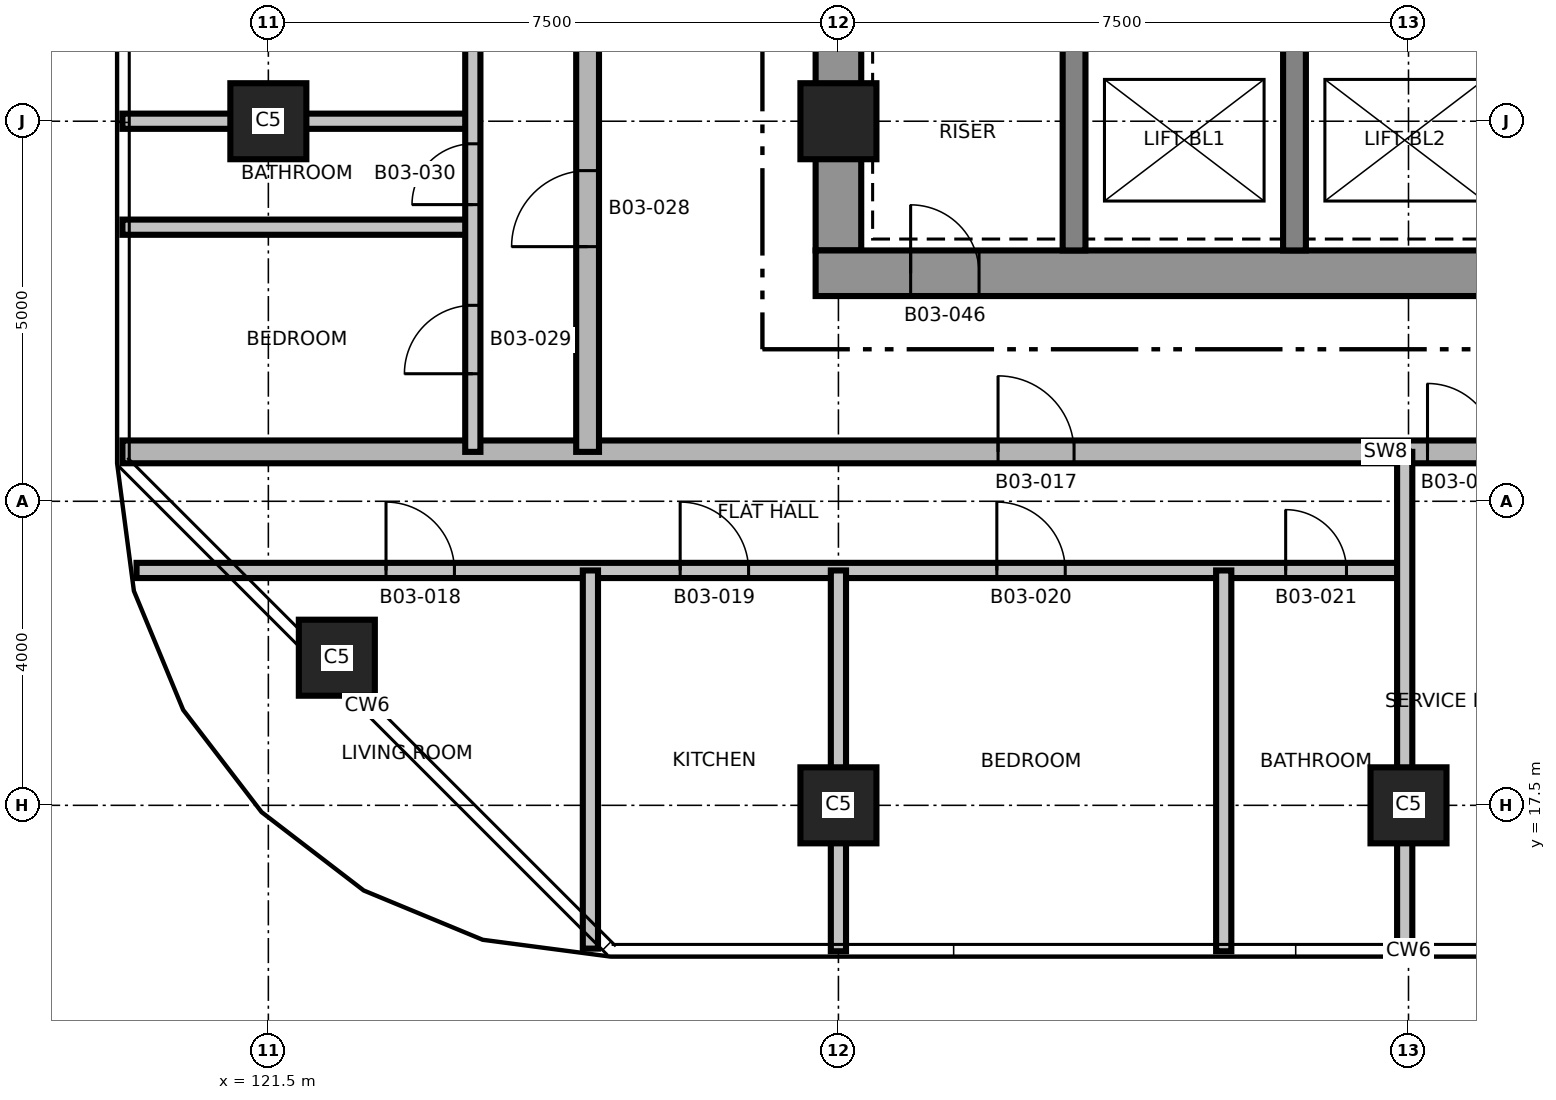
"""IFC4 building model, lengths in metres.
Left out: names, types, materials, properties, quantities, classifications, styles, units other than length and angle.
Written with IfcOpenShell. Run it as: python <this file> out.ifc"""

import sys

from ifc_helpers import new_model, si_unit, direction, frame, frame_2d, origin, origin_2d, place, context, subcontext, project, spatial, rectangle, extrude, element, fill, save


model = new_model("IFC4")
c1 = context("Model", 3, precision=1e-05, world=origin(), true_north=direction((0.0, 1.0)))
c2 = subcontext(c1, "Body", "Model", "MODEL_VIEW")
j1 = project(units=[si_unit("LENGTHUNIT", "METRE"), si_unit("PLANEANGLEUNIT", "RADIAN")], contexts=[c1])
p1 = place(None, origin())
s1 = spatial("IfcSite", under=j1, at=p1, CompositionType="ELEMENT")
p2 = place(p1, origin())
s2 = spatial("IfcBuilding", under=s1, at=p2, CompositionType="ELEMENT")
p3 = place(p2, frame((0.0, 0.0, 52.0)))
s3 = spatial("IfcBuildingStorey", under=s2, at=p3, CompositionType="ELEMENT", Elevation=52.0)
p4 = place(p3, frame((129.0, 24.8, 0.0), z_axis=(0.0, 0.0, 1.0), x_axis=(0.0, 1.0, 0.0)))
e1 = element("IfcWall", 1, at=p4, inside=s3, PredefinedType="SHEAR", context=c2, shape_type="SweptSolid", body=[
    extrude(rectangle(XDim=12.4, YDim=0.6, at=frame_2d((6.2, 0.0))), origin(), (0.0, 0.0, 1.0), 3.7),
])
p5 = place(p4, frame((5.15, 0.0, 0.0)))
e2 = element("IfcOpeningElement", 2, at=p5, cuts=e1, PredefinedType="OPENING", context=c2, shape_type="SweptSolid", body=[
    extrude(rectangle(XDim=1.0, YDim=2.1, at=frame_2d((0.5, 1.05))), frame((0.0, 0.31, 0.0), z_axis=(0.0, -1.0, 0.0), x_axis=(1.0, 0.0, 0.0)), (0.0, 0.0, 1.0), 0.62),
])
p6 = place(p3, frame((128.7, 24.5, 0.0), z_axis=(0.0, 0.0, 1.0), x_axis=(1.0, 0.0, 0.0)))
e3 = element("IfcWall", 3, at=p6, inside=s3, PredefinedType="SHEAR", context=c2, shape_type="SweptSolid", body=[
    extrude(rectangle(XDim=15.0, YDim=0.6, at=frame_2d((7.5, 0.0))), origin(), (0.0, 0.0, 1.0), 3.7),
])
p7 = place(p6, frame((9.65, 0.0, 0.0)))
e4 = element("IfcOpeningElement", 4, at=p7, cuts=e3, PredefinedType="OPENING", context=c2, shape_type="SweptSolid", body=[
    extrude(rectangle(XDim=1.5, YDim=2.1, at=frame_2d((0.75, 1.05))), frame((0.0, 0.31, 0.0), z_axis=(0.0, -1.0, 0.0), x_axis=(1.0, 0.0, 0.0)), (0.0, 0.0, 1.0), 0.62),
])
p8 = place(p6, frame((1.25, 0.0, 0.0)))
e5 = element("IfcOpeningElement", 5, at=p8, cuts=e3, PredefinedType="OPENING", context=c2, shape_type="SweptSolid", body=[
    extrude(rectangle(XDim=0.9, YDim=2.1, at=frame_2d((0.45, 1.05))), frame((0.0, 0.31, 0.0), z_axis=(0.0, -1.0, 0.0), x_axis=(1.0, 0.0, 0.0)), (0.0, 0.0, 1.0), 0.62),
])
p9 = place(p3, frame((132.1, 24.8, 0.0), z_axis=(0.0, 0.0, 1.0), x_axis=(0.0, 1.0, 0.0)))
e6 = element("IfcWall", 6, at=p9, inside=s3, PredefinedType="SHEAR", context=c2, shape_type="SweptSolid", body=[
    extrude(rectangle(XDim=12.4, YDim=0.3, at=frame_2d((6.2, 0.0))), origin(), (0.0, 0.0, 1.0), 3.7),
])
p10 = place(p9, frame((3.9, 0.0, 0.0)))
e7 = element("IfcOpeningElement", 7, at=p10, cuts=e6, PredefinedType="OPENING", context=c2, shape_type="SweptSolid", body=[
    extrude(rectangle(XDim=1.2, YDim=2.1, at=frame_2d((0.6, 1.05))), frame((0.0, 0.16, 0.0), z_axis=(0.0, -1.0, 0.0), x_axis=(1.0, 0.0, 0.0)), (0.0, 0.0, 1.0), 0.32),
])
p11 = place(p3, frame((135.0, 24.8, 0.0), z_axis=(0.0, 0.0, 1.0), x_axis=(0.0, 1.0, 0.0)))
e8 = element("IfcWall", 8, at=p11, inside=s3, PredefinedType="SHEAR", context=c2, shape_type="SweptSolid", body=[
    extrude(rectangle(XDim=2.75, YDim=0.3, at=frame_2d((1.375, 0.0))), origin(), (0.0, 0.0, 1.0), 3.7),
])
for number, where, z_axis, x_axis in (
    (9, (129.0, 17.5, 0.0), (0.0, 0.0, 1.0), (1.0, 0.0, 0.0)),
    (10, (136.5, 17.5, 0.0), (0.0, 0.0, 1.0), (1.0, 0.0, 0.0)),
    (11, (122.401, 19.442, 0.0), (0.0, 0.0, 1.0), (1.0, 0.0, 0.0)),
    (12, (121.5, 26.5, 0.0), (0.0, 0.0, 1.0), (1.0, 0.0, 0.0)),
    (13, (129.0, 26.5, 0.0), (0.0, 0.0, 1.0), (1.0, 0.0, 0.0)),
):
    element("IfcColumn", number, at=place(p3, frame(where, z_axis=z_axis, x_axis=x_axis)), inside=s3, PredefinedType="COLUMN", context=c2, shape_type="SweptSolid", body=[
        extrude(rectangle(XDim=1.0, YDim=1.0, at=origin_2d()), origin(), (0.0, 0.0, 1.0), 3.7),
    ])
p12 = place(p3, frame((119.766, 20.59, 0.0), z_axis=(0.0, 0.0, 1.0), x_axis=(1.0, 0.0, 0.0)))
e14 = element("IfcWall", 14, at=p12, inside=s3, PredefinedType="PARTITIONING", context=c2, shape_type="SweptSolid", body=[
    extrude(rectangle(XDim=16.734, YDim=0.2, at=frame_2d((8.367, 0.0))), origin(), (0.0, 0.0, 1.0), 3.4),
])
p13 = place(p12, frame((3.282, 0.0, 0.0)))
e15 = element("IfcOpeningElement", 15, at=p13, cuts=e14, PredefinedType="OPENING", context=c2, shape_type="SweptSolid", body=[
    extrude(rectangle(XDim=0.9, YDim=2.1, at=frame_2d((0.45, 1.05))), frame((0.0, 0.11, 0.0), z_axis=(0.0, -1.0, 0.0), x_axis=(1.0, 0.0, 0.0)), (0.0, 0.0, 1.0), 0.22),
])
p14 = place(p12, frame((7.152, 0.0, 0.0)))
e16 = element("IfcOpeningElement", 16, at=p14, cuts=e14, PredefinedType="OPENING", context=c2, shape_type="SweptSolid", body=[
    extrude(rectangle(XDim=0.9, YDim=2.1, at=frame_2d((0.45, 1.05))), frame((0.0, 0.11, 0.0), z_axis=(0.0, -1.0, 0.0), x_axis=(1.0, 0.0, 0.0)), (0.0, 0.0, 1.0), 0.22),
])
p15 = place(p12, frame((11.318, 0.0, 0.0)))
e17 = element("IfcOpeningElement", 17, at=p15, cuts=e14, PredefinedType="OPENING", context=c2, shape_type="SweptSolid", body=[
    extrude(rectangle(XDim=0.9, YDim=2.1, at=frame_2d((0.45, 1.05))), frame((0.0, 0.11, 0.0), z_axis=(0.0, -1.0, 0.0), x_axis=(1.0, 0.0, 0.0)), (0.0, 0.0, 1.0), 0.22),
])
p16 = place(p12, frame((15.118, 0.0, 0.0)))
e18 = element("IfcOpeningElement", 18, at=p16, cuts=e14, PredefinedType="OPENING", context=c2, shape_type="SweptSolid", body=[
    extrude(rectangle(XDim=0.8, YDim=2.1, at=frame_2d((0.4, 1.05))), frame((0.0, 0.11, 0.0), z_axis=(0.0, -1.0, 0.0), x_axis=(1.0, 0.0, 0.0)), (0.0, 0.0, 1.0), 0.22),
])
p17 = place(p3, frame((119.58, 22.15, 0.0), z_axis=(0.0, 0.0, 1.0), x_axis=(1.0, 0.0, 0.0)))
e19 = element("IfcWall", 19, at=p17, inside=s3, PredefinedType="SHEAR", context=c2, shape_type="SweptSolid", body=[
    extrude(rectangle(XDim=33.84, YDim=0.3, at=frame_2d((16.92, 0.0))), origin(), (0.0, 0.0, 1.0), 3.4),
])
p18 = place(p17, frame((23.17, 0.0, 0.0)))
e20 = element("IfcOpeningElement", 20, at=p18, cuts=e19, PredefinedType="OPENING", context=c2, shape_type="SweptSolid", body=[
    extrude(rectangle(XDim=1.0, YDim=2.1, at=frame_2d((0.5, 1.05))), frame((0.0, 0.16, 0.0), z_axis=(0.0, -1.0, 0.0), x_axis=(1.0, 0.0, 0.0)), (0.0, 0.0, 1.0), 0.32),
])
p19 = place(p17, frame((11.52, 0.0, 0.0)))
e21 = element("IfcOpeningElement", 21, at=p19, cuts=e19, PredefinedType="OPENING", context=c2, shape_type="SweptSolid", body=[
    extrude(rectangle(XDim=1.0, YDim=2.1, at=frame_2d((0.5, 1.05))), frame((0.0, 0.16, 0.0), z_axis=(0.0, -1.0, 0.0), x_axis=(1.0, 0.0, 0.0)), (0.0, 0.0, 1.0), 0.32),
])
p20 = place(p17, frame((25.07, 0.0, 0.0)))
e22 = element("IfcOpeningElement", 22, at=p20, cuts=e19, PredefinedType="OPENING", context=c2, shape_type="SweptSolid", body=[
    extrude(rectangle(XDim=1.0, YDim=2.1, at=frame_2d((0.5, 1.05))), frame((0.0, 0.16, 0.0), z_axis=(0.0, -1.0, 0.0), x_axis=(1.0, 0.0, 0.0)), (0.0, 0.0, 1.0), 0.32),
])
p21 = place(p17, frame((17.17, 0.0, 0.0)))
e23 = element("IfcOpeningElement", 23, at=p21, cuts=e19, PredefinedType="OPENING", context=c2, shape_type="SweptSolid", body=[
    extrude(rectangle(XDim=0.9, YDim=2.1, at=frame_2d((0.45, 1.05))), frame((0.0, 0.16, 0.0), z_axis=(0.0, -1.0, 0.0), x_axis=(1.0, 0.0, 0.0)), (0.0, 0.0, 1.0), 0.32),
])
for number, where, z_axis, x_axis in (
    (24, (119.58, 25.106, 0.0), (0.0, 0.0, 1.0), (1.0, 0.0, 0.0)),
    (25, (119.58, 26.5, 0.0), (0.0, 0.0, 1.0), (1.0, 0.0, 0.0)),
):
    element("IfcWall", number, at=place(p3, frame(where, z_axis=z_axis, x_axis=x_axis)), inside=s3, PredefinedType="PARTITIONING", context=c2, shape_type="SweptSolid", body=[
        extrude(rectangle(XDim=4.61, YDim=0.2, at=frame_2d((2.305, 0.0))), origin(), (0.0, 0.0, 1.0), 3.4),
    ])
p22 = place(p3, frame((124.19, 22.15, 0.0), z_axis=(0.0, 0.0, 1.0), x_axis=(0.0, 1.0, 0.0)))
e26 = element("IfcWall", 26, at=p22, inside=s3, PredefinedType="PARTITIONING", context=c2, shape_type="SweptSolid", body=[
    extrude(rectangle(XDim=17.7, YDim=0.2, at=frame_2d((8.85, 0.0))), origin(), (0.0, 0.0, 1.0), 3.4),
])
p23 = place(p22, frame((1.028, 0.0, 0.0)))
e27 = element("IfcOpeningElement", 27, at=p23, cuts=e26, PredefinedType="OPENING", context=c2, shape_type="SweptSolid", body=[
    extrude(rectangle(XDim=0.9, YDim=2.1, at=frame_2d((0.45, 1.05))), frame((0.0, 0.11, 0.0), z_axis=(0.0, -1.0, 0.0), x_axis=(1.0, 0.0, 0.0)), (0.0, 0.0, 1.0), 0.22),
])
p24 = place(p22, frame((3.253, 0.0, 0.0)))
e28 = element("IfcOpeningElement", 28, at=p24, cuts=e26, PredefinedType="OPENING", context=c2, shape_type="SweptSolid", body=[
    extrude(rectangle(XDim=0.8, YDim=2.1, at=frame_2d((0.4, 1.05))), frame((0.0, 0.11, 0.0), z_axis=(0.0, -1.0, 0.0), x_axis=(1.0, 0.0, 0.0)), (0.0, 0.0, 1.0), 0.22),
])
p25 = place(p22, frame((6.867, 0.0, 0.0)))
e29 = element("IfcOpeningElement", 29, at=p25, cuts=e26, PredefinedType="OPENING", context=c2, shape_type="SweptSolid", body=[
    extrude(rectangle(XDim=0.9, YDim=2.1, at=frame_2d((0.45, 1.05))), frame((0.0, 0.11, 0.0), z_axis=(0.0, -1.0, 0.0), x_axis=(1.0, 0.0, 0.0)), (0.0, 0.0, 1.0), 0.22),
])
p26 = place(p22, frame((11.367, 0.0, 0.0)))
e30 = element("IfcOpeningElement", 30, at=p26, cuts=e26, PredefinedType="OPENING", context=c2, shape_type="SweptSolid", body=[
    extrude(rectangle(XDim=0.9, YDim=2.1, at=frame_2d((0.45, 1.05))), frame((0.0, 0.11, 0.0), z_axis=(0.0, -1.0, 0.0), x_axis=(1.0, 0.0, 0.0)), (0.0, 0.0, 1.0), 0.22),
])
p27 = place(p22, frame((15.075, 0.0, 0.0)))
e31 = element("IfcOpeningElement", 31, at=p27, cuts=e26, PredefinedType="OPENING", context=c2, shape_type="SweptSolid", body=[
    extrude(rectangle(XDim=0.9, YDim=2.1, at=frame_2d((0.45, 1.05))), frame((0.0, 0.11, 0.0), z_axis=(0.0, -1.0, 0.0), x_axis=(1.0, 0.0, 0.0)), (0.0, 0.0, 1.0), 0.22),
])
p28 = place(p3, frame((125.7, 22.15, 0.0), z_axis=(0.0, 0.0, 1.0), x_axis=(0.0, 1.0, 0.0)))
e32 = element("IfcWall", 32, at=p28, inside=s3, PredefinedType="SHEAR", context=c2, shape_type="SweptSolid", body=[
    extrude(rectangle(XDim=17.7, YDim=0.3, at=frame_2d((8.85, 0.0))), origin(), (0.0, 0.0, 1.0), 3.4),
])
p29 = place(p28, frame((2.7, 0.0, 0.0)))
e33 = element("IfcOpeningElement", 33, at=p29, cuts=e32, PredefinedType="OPENING", context=c2, shape_type="SweptSolid", body=[
    extrude(rectangle(XDim=1.0, YDim=2.1, at=frame_2d((0.5, 1.05))), frame((0.0, 0.16, 0.0), z_axis=(0.0, -1.0, 0.0), x_axis=(1.0, 0.0, 0.0)), (0.0, 0.0, 1.0), 0.32),
])
p30 = place(p3, frame((125.737, 15.615, 0.0), z_axis=(0.0, 0.0, 1.0), x_axis=(0.0, 1.0, 0.0)))
e34 = element("IfcWall", 34, at=p30, inside=s3, PredefinedType="PARTITIONING", context=c2, shape_type="SweptSolid", body=[
    extrude(rectangle(XDim=4.975, YDim=0.2, at=frame_2d((2.488, 0.0))), origin(), (0.0, 0.0, 1.0), 3.4),
])
for number, where, z_axis, x_axis in (
    (35, (129.0, 15.58, 0.0), (0.0, 0.0, 1.0), (0.0, 1.0, 0.0)),
    (36, (134.069, 15.58, 0.0), (0.0, 0.0, 1.0), (0.0, 1.0, 0.0)),
):
    element("IfcWall", number, at=place(p3, frame(where, z_axis=z_axis, x_axis=x_axis)), inside=s3, PredefinedType="PARTITIONING", context=c2, shape_type="SweptSolid", body=[
        extrude(rectangle(XDim=5.01, YDim=0.2, at=frame_2d((2.505, 0.0))), origin(), (0.0, 0.0, 1.0), 3.4),
    ])
p31 = place(p3, frame((136.45, 15.58, 0.0), z_axis=(0.0, 0.0, 1.0), x_axis=(0.0, 1.0, 0.0)))
e37 = element("IfcWall", 37, at=p31, inside=s3, PredefinedType="PARTITIONING", context=c2, shape_type="SweptSolid", body=[
    extrude(rectangle(XDim=6.57, YDim=0.2, at=frame_2d((3.285, 0.0))), origin(), (0.0, 0.0, 1.0), 3.4),
])
p32 = place(p19, origin())
e38 = element("IfcDoor", 38, at=p32, inside=s3, OperationType="SINGLE_SWING_LEFT", PredefinedType="DOOR", context=c2, shape_type="SweptSolid", body=[
    extrude(rectangle(XDim=1.0, YDim=2.1, at=frame_2d((0.5, 1.05))), frame((0.0, 0.025, 0.0), z_axis=(0.0, -1.0, 0.0), x_axis=(1.0, 0.0, 0.0)), (0.0, 0.0, 1.0), 0.05),
])
fill(e21, e38)
p33 = place(p13, origin())
e39 = element("IfcDoor", 39, at=p33, inside=s3, OperationType="SINGLE_SWING_RIGHT", PredefinedType="DOOR", context=c2, shape_type="SweptSolid", body=[
    extrude(rectangle(XDim=0.9, YDim=2.1, at=frame_2d((0.45, 1.05))), frame((0.0, 0.025, 0.0), z_axis=(0.0, -1.0, 0.0), x_axis=(1.0, 0.0, 0.0)), (0.0, 0.0, 1.0), 0.05),
])
fill(e15, e39)
p34 = place(p14, origin())
e40 = element("IfcDoor", 40, at=p34, inside=s3, OperationType="SINGLE_SWING_LEFT", PredefinedType="DOOR", context=c2, shape_type="SweptSolid", body=[
    extrude(rectangle(XDim=0.9, YDim=2.1, at=frame_2d((0.45, 1.05))), frame((0.0, 0.025, 0.0), z_axis=(0.0, -1.0, 0.0), x_axis=(1.0, 0.0, 0.0)), (0.0, 0.0, 1.0), 0.05),
])
fill(e16, e40)
p35 = place(p15, origin())
e41 = element("IfcDoor", 41, at=p35, inside=s3, OperationType="SINGLE_SWING_RIGHT", PredefinedType="DOOR", context=c2, shape_type="SweptSolid", body=[
    extrude(rectangle(XDim=0.9, YDim=2.1, at=frame_2d((0.45, 1.05))), frame((0.0, 0.025, 0.0), z_axis=(0.0, -1.0, 0.0), x_axis=(1.0, 0.0, 0.0)), (0.0, 0.0, 1.0), 0.05),
])
fill(e17, e41)
p36 = place(p16, origin())
e42 = element("IfcDoor", 42, at=p36, inside=s3, OperationType="SINGLE_SWING_LEFT", PredefinedType="DOOR", context=c2, shape_type="SweptSolid", body=[
    extrude(rectangle(XDim=0.8, YDim=2.1, at=frame_2d((0.4, 1.05))), frame((0.0, 0.025, 0.0), z_axis=(0.0, -1.0, 0.0), x_axis=(1.0, 0.0, 0.0)), (0.0, 0.0, 1.0), 0.05),
])
fill(e18, e42)
p37 = place(p21, origin())
e43 = element("IfcDoor", 43, at=p37, inside=s3, OperationType="SINGLE_SWING_RIGHT", PredefinedType="DOOR", context=c2, shape_type="SweptSolid", body=[
    extrude(rectangle(XDim=0.9, YDim=2.1, at=frame_2d((0.45, 1.05))), frame((0.0, 0.025, 0.0), z_axis=(0.0, -1.0, 0.0), x_axis=(1.0, 0.0, 0.0)), (0.0, 0.0, 1.0), 0.05),
])
fill(e23, e43)
p38 = place(p29, origin())
e44 = element("IfcDoor", 44, at=p38, inside=s3, OperationType="SINGLE_SWING_RIGHT", PredefinedType="DOOR", context=c2, shape_type="SweptSolid", body=[
    extrude(rectangle(XDim=1.0, YDim=2.1, at=frame_2d((0.5, 1.05))), frame((0.0, 0.025, 0.0), z_axis=(0.0, -1.0, 0.0), x_axis=(1.0, 0.0, 0.0)), (0.0, 0.0, 1.0), 0.05),
])
fill(e33, e44)
p39 = place(p23, origin())
e45 = element("IfcDoor", 45, at=p39, inside=s3, OperationType="SINGLE_SWING_LEFT", PredefinedType="DOOR", context=c2, shape_type="SweptSolid", body=[
    extrude(rectangle(XDim=0.9, YDim=2.1, at=frame_2d((0.45, 1.05))), frame((0.0, 0.025, 0.0), z_axis=(0.0, -1.0, 0.0), x_axis=(1.0, 0.0, 0.0)), (0.0, 0.0, 1.0), 0.05),
])
fill(e27, e45)
p40 = place(p24, origin())
e46 = element("IfcDoor", 46, at=p40, inside=s3, OperationType="SINGLE_SWING_RIGHT", PredefinedType="DOOR", context=c2, shape_type="SweptSolid", body=[
    extrude(rectangle(XDim=0.8, YDim=2.1, at=frame_2d((0.4, 1.05))), frame((0.0, 0.025, 0.0), z_axis=(0.0, -1.0, 0.0), x_axis=(1.0, 0.0, 0.0)), (0.0, 0.0, 1.0), 0.05),
])
fill(e28, e46)
p41 = place(p8, origin())
e47 = element("IfcDoor", 47, at=p41, inside=s3, OperationType="SINGLE_SWING_LEFT", PredefinedType="DOOR", context=c2, shape_type="SweptSolid", body=[
    extrude(rectangle(XDim=0.9, YDim=2.1, at=frame_2d((0.45, 1.05))), frame((0.0, 0.025, 0.0), z_axis=(0.0, -1.0, 0.0), x_axis=(1.0, 0.0, 0.0)), (0.0, 0.0, 1.0), 0.05),
])
fill(e5, e47)
save(model, sys.argv[1])
